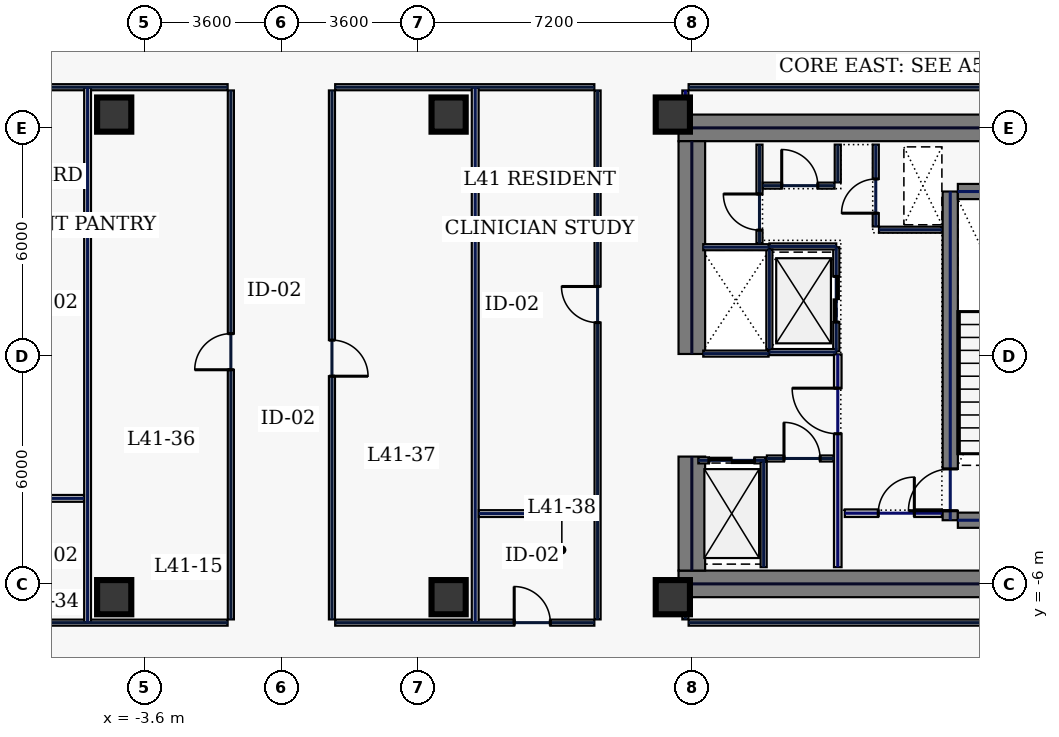
"""IFC4 building model, lengths in metres.
Left out: names, types, materials, properties, quantities, classifications, styles, units other than length and angle.
Written with IfcOpenShell. Run it as: python <this file> out.ifc"""

import sys

from ifc_helpers import new_model, si_unit, direction, frame, frame_2d, origin, origin_2d, place, context, subcontext, project, spatial, rectangle, hollow_rectangle, extrude, element, fill, save


model = new_model("IFC4")
c1 = context("Model", 3, precision=1e-05, world=origin(), true_north=direction((0.0, 1.0)))
c2 = subcontext(c1, "Body", "Model", "MODEL_VIEW")
j1 = project(units=[si_unit("LENGTHUNIT", "METRE"), si_unit("PLANEANGLEUNIT", "RADIAN")], contexts=[c1])
p1 = place(None, origin())
s1 = spatial("IfcSite", under=j1, at=p1, CompositionType="ELEMENT")
p2 = place(p1, origin())
s2 = spatial("IfcBuilding", under=s1, at=p2, CompositionType="ELEMENT")
p3 = place(p2, frame((0.0, 0.0, 180.2)))
s3 = spatial("IfcBuildingStorey", under=s2, at=p3, CompositionType="ELEMENT", Elevation=180.2)
for number, where, z_axis, x_axis in (
    (1, (10.45, 6.0, 0.0), (0.0, 0.0, 1.0), (1.0, 0.0, 0.0)),
    (2, (10.45, -6.0, 0.0), (0.0, 0.0, 1.0), (1.0, 0.0, 0.0)),
):
    element("IfcWall", number, at=place(p3, frame(where, z_axis=z_axis, x_axis=x_axis)), inside=s3, PredefinedType="SHEAR", context=c2, shape_type="SweptSolid", body=[
        extrude(rectangle(XDim=11.55, YDim=0.7, at=frame_2d((5.775, 0.0))), origin(), (0.0, 0.0, 1.0), 3.74),
    ])
p4 = place(p3, frame((10.8, -5.65, 0.0), z_axis=(0.0, 0.0, 1.0), x_axis=(0.0, 1.0, 0.0)))
e3 = element("IfcWall", 3, at=p4, inside=s3, PredefinedType="SHEAR", context=c2, shape_type="SweptSolid", body=[
    extrude(rectangle(XDim=3.0, YDim=0.7, at=frame_2d((1.5, 0.0))), origin(), (0.0, 0.0, 1.0), 3.74),
])
p5 = place(p3, frame((10.8, 0.05, 0.0), z_axis=(0.0, 0.0, 1.0), x_axis=(0.0, 1.0, 0.0)))
e4 = element("IfcWall", 4, at=p5, inside=s3, PredefinedType="SHEAR", context=c2, shape_type="SweptSolid", body=[
    extrude(rectangle(XDim=5.6, YDim=0.7, at=frame_2d((2.8, 0.0))), origin(), (0.0, 0.0, 1.0), 3.74),
])
p6 = place(p3, frame((17.6, -4.325, 0.0), z_axis=(0.0, 0.0, 1.0), x_axis=(0.0, 1.0, 0.0)))
e5 = element("IfcWall", 5, at=p6, inside=s3, PredefinedType="SHEAR", context=c2, shape_type="SweptSolid", body=[
    extrude(rectangle(XDim=8.65, YDim=0.4, at=frame_2d((4.325, 0.0))), origin(), (0.0, 0.0, 1.0), 3.74),
])
p7 = place(p6, frame((0.25, 0.0, 0.0)))
e6 = element("IfcOpeningElement", 6, at=p7, cuts=e5, PredefinedType="OPENING", context=c2, shape_type="SweptSolid", body=[
    extrude(rectangle(XDim=1.1, YDim=2.2, at=frame_2d((0.55, 1.1))), frame((0.0, 0.21, 0.0), z_axis=(0.0, -1.0, 0.0), x_axis=(1.0, 0.0, 0.0)), (0.0, 0.0, 1.0), 0.42),
])
for number, where, z_axis, x_axis in (
    (7, (17.8, -4.325, 0.0), (0.0, 0.0, 1.0), (1.0, 0.0, 0.0)),
    (8, (17.8, 4.325, 0.0), (0.0, 0.0, 1.0), (1.0, 0.0, 0.0)),
):
    element("IfcWall", number, at=place(p3, frame(where, z_axis=z_axis, x_axis=x_axis)), inside=s3, PredefinedType="SHEAR", context=c2, shape_type="SweptSolid", body=[
        extrude(rectangle(XDim=3.4, YDim=0.4, at=frame_2d((1.7, 0.0))), origin(), (0.0, 0.0, 1.0), 3.74),
    ])
for number, where, z_axis, x_axis in (
    (9, (10.3, -6.35, 0.0), (0.0, 0.0, 1.0), (1.0, 0.0, 0.0)),
    (10, (10.3, 6.35, 0.0), (0.0, 0.0, 1.0), (1.0, 0.0, 0.0)),
    (11, (-4.4, -6.35, 0.0), (0.0, 0.0, 1.0), (1.0, 0.0, 0.0)),
    (12, (4.4, -6.35, 0.0), (0.0, 0.0, 1.0), (1.0, 0.0, 0.0)),
    (13, (-4.4, 6.35, 0.0), (0.0, 0.0, 1.0), (1.0, 0.0, 0.0)),
    (14, (4.4, 6.35, 0.0), (0.0, 0.0, 1.0), (1.0, 0.0, 0.0)),
):
    element("IfcColumn", number, at=place(p3, frame(where, z_axis=z_axis, x_axis=x_axis)), inside=s3, PredefinedType="COLUMN", context=c2, shape_type="SweptSolid", body=[
        extrude(hollow_rectangle(XDim=0.9, YDim=0.9, WallThickness=0.04, at=origin_2d()), origin(), (0.0, 0.0, 1.0), 3.74),
    ])
p8 = place(p3, frame((14.6, 0.12, 0.0), z_axis=(0.0, 0.0, 1.0), x_axis=(0.0, 1.0, 0.0)))
e15 = element("IfcWall", 15, at=p8, inside=s3, PredefinedType="PARTITIONING", context=c2, shape_type="SweptSolid", body=[
    extrude(rectangle(XDim=2.74, YDim=0.16, at=frame_2d((1.37, 0.0))), origin(), (0.0, 0.0, 1.0), 3.74),
])
p9 = place(p8, frame((0.77, 0.0, 0.0)))
e16 = element("IfcOpeningElement", 16, at=p9, cuts=e15, PredefinedType="OPENING", context=c2, shape_type="SweptSolid", body=[
    extrude(rectangle(XDim=1.2, YDim=2.2, at=frame_2d((0.6, 1.1))), frame((0.0, 0.09, 0.0), z_axis=(0.0, -1.0, 0.0), x_axis=(1.0, 0.0, 0.0)), (0.0, 0.0, 1.0), 0.18),
])
for number, where, z_axis, x_axis in (
    (17, (12.84, 0.1, 0.0), (0.0, 0.0, 1.0), (1.0, 0.0, 0.0)),
    (18, (12.84, 2.88, 0.0), (0.0, 0.0, 1.0), (1.0, 0.0, 0.0)),
):
    element("IfcWall", number, at=place(p3, frame(where, z_axis=z_axis, x_axis=x_axis)), inside=s3, PredefinedType="PARTITIONING", context=c2, shape_type="SweptSolid", body=[
        extrude(rectangle(XDim=1.76, YDim=0.16, at=frame_2d((0.88, 0.0))), origin(), (0.0, 0.0, 1.0), 3.74),
    ])
p10 = place(p3, frame((12.84, 0.18, 0.0), z_axis=(0.0, 0.0, 1.0), x_axis=(0.0, 1.0, 0.0)))
e19 = element("IfcWall", 19, at=p10, inside=s3, PredefinedType="PARTITIONING", context=c2, shape_type="SweptSolid", body=[
    extrude(rectangle(XDim=2.62, YDim=0.16, at=frame_2d((1.31, 0.0))), origin(), (0.0, 0.0, 1.0), 3.74),
])
p11 = place(p3, frame((10.97, -2.75, 0.0), z_axis=(0.0, 0.0, 1.0), x_axis=(1.0, 0.0, 0.0)))
e20 = element("IfcWall", 20, at=p11, inside=s3, PredefinedType="PARTITIONING", context=c2, shape_type="SweptSolid", body=[
    extrude(rectangle(XDim=1.76, YDim=0.16, at=frame_2d((0.88, 0.0))), origin(), (0.0, 0.0, 1.0), 3.74),
])
p12 = place(p11, frame((0.28, 0.0, 0.0)))
e21 = element("IfcOpeningElement", 21, at=p12, cuts=e20, PredefinedType="OPENING", context=c2, shape_type="SweptSolid", body=[
    extrude(rectangle(XDim=1.2, YDim=2.2, at=frame_2d((0.6, 1.1))), frame((0.0, 0.09, 0.0), z_axis=(0.0, -1.0, 0.0), x_axis=(1.0, 0.0, 0.0)), (0.0, 0.0, 1.0), 0.18),
])
for number, where, z_axis, x_axis in (
    (22, (11.1, 0.06, 0.0), (0.0, 0.0, 1.0), (1.0, 0.0, 0.0)),
    (23, (11.1, 2.86, 0.0), (0.0, 0.0, 1.0), (1.0, 0.0, 0.0)),
):
    element("IfcWall", number, at=place(p3, frame(where, z_axis=z_axis, x_axis=x_axis)), inside=s3, PredefinedType="PARTITIONING", context=c2, shape_type="SweptSolid", body=[
        extrude(rectangle(XDim=1.72, YDim=0.16, at=frame_2d((0.86, 0.0))), origin(), (0.0, 0.0, 1.0), 3.74),
    ])
p13 = place(p3, frame((15.64, 3.405, 0.0), z_axis=(0.0, 0.0, 1.0), x_axis=(0.0, 1.0, 0.0)))
e24 = element("IfcWall", 24, at=p13, inside=s3, PredefinedType="PARTITIONING", context=c2, shape_type="SweptSolid", body=[
    extrude(rectangle(XDim=2.155, YDim=0.16, at=frame_2d((1.078, 0.0))), origin(), (0.0, 0.0, 1.0), 3.74),
])
p14 = place(p13, frame((0.35, 0.0, 0.0)))
e25 = element("IfcOpeningElement", 25, at=p14, cuts=e24, PredefinedType="OPENING", context=c2, shape_type="SweptSolid", body=[
    extrude(rectangle(XDim=0.9, YDim=2.2, at=frame_2d((0.45, 1.1))), frame((0.0, 0.09, 0.0), z_axis=(0.0, -1.0, 0.0), x_axis=(1.0, 0.0, 0.0)), (0.0, 0.0, 1.0), 0.18),
])
p15 = place(p3, frame((15.725, 3.32, 0.0), z_axis=(0.0, 0.0, 1.0), x_axis=(1.0, 0.0, 0.0)))
e26 = element("IfcWall", 26, at=p15, inside=s3, PredefinedType="PARTITIONING", context=c2, shape_type="SweptSolid", body=[
    extrude(rectangle(XDim=1.655, YDim=0.16, at=frame_2d((0.827, 0.0))), origin(), (0.0, 0.0, 1.0), 3.74),
])
p16 = place(p3, frame((14.825, -4.14, 0.0), z_axis=(0.0, 0.0, 1.0), x_axis=(1.0, 0.0, 0.0)))
e27 = element("IfcWall", 27, at=p16, inside=s3, PredefinedType="SOLIDWALL", context=c2, shape_type="SweptSolid", body=[
    extrude(rectangle(XDim=2.555, YDim=0.2, at=frame_2d((1.277, 0.0))), origin(), (0.0, 0.0, 1.0), 3.74),
])
p17 = place(p16, frame((0.88, 0.0, 0.0)))
e28 = element("IfcOpeningElement", 28, at=p17, cuts=e27, PredefinedType="OPENING", context=c2, shape_type="SweptSolid", body=[
    extrude(rectangle(XDim=0.95, YDim=2.2, at=frame_2d((0.475, 1.1))), frame((0.0, 0.11, 0.0), z_axis=(0.0, -1.0, 0.0), x_axis=(1.0, 0.0, 0.0)), (0.0, 0.0, 1.0), 0.22),
])
p18 = place(p3, frame((12.775, -2.7, 0.0), z_axis=(0.0, 0.0, 1.0), x_axis=(1.0, 0.0, 0.0)))
e29 = element("IfcWall", 29, at=p18, inside=s3, PredefinedType="PARTITIONING", context=c2, shape_type="SweptSolid", body=[
    extrude(rectangle(XDim=1.76, YDim=0.16, at=frame_2d((0.88, 0.0))), origin(), (0.0, 0.0, 1.0), 3.74),
])
p19 = place(p18, frame((0.45, 0.0, 0.0)))
e30 = element("IfcOpeningElement", 30, at=p19, cuts=e29, PredefinedType="OPENING", context=c2, shape_type="SweptSolid", body=[
    extrude(rectangle(XDim=0.95, YDim=2.2, at=frame_2d((0.475, 1.1))), frame((0.0, 0.09, 0.0), z_axis=(0.0, -1.0, 0.0), x_axis=(1.0, 0.0, 0.0)), (0.0, 0.0, 1.0), 0.18),
])
p20 = place(p3, frame((12.69, -5.56, 0.0), z_axis=(0.0, 0.0, 1.0), x_axis=(0.0, 1.0, 0.0)))
e31 = element("IfcWall", 31, at=p20, inside=s3, PredefinedType="PARTITIONING", context=c2, shape_type="SweptSolid", body=[
    extrude(rectangle(XDim=2.775, YDim=0.16, at=frame_2d((1.388, 0.0))), origin(), (0.0, 0.0, 1.0), 3.74),
])
p21 = place(p3, frame((12.58, 2.96, 0.0), z_axis=(0.0, 0.0, 1.0), x_axis=(0.0, 1.0, 0.0)))
e32 = element("IfcWall", 32, at=p21, inside=s3, PredefinedType="PARTITIONING", context=c2, shape_type="SweptSolid", body=[
    extrude(rectangle(XDim=2.6, YDim=0.16, at=frame_2d((1.3, 0.0))), origin(), (0.0, 0.0, 1.0), 3.74),
])
p22 = place(p21, frame((0.35, 0.0, 0.0)))
e33 = element("IfcOpeningElement", 33, at=p22, cuts=e32, PredefinedType="OPENING", context=c2, shape_type="SweptSolid", body=[
    extrude(rectangle(XDim=0.95, YDim=2.2, at=frame_2d((0.475, 1.1))), frame((0.0, 0.09, 0.0), z_axis=(0.0, -1.0, 0.0), x_axis=(1.0, 0.0, 0.0)), (0.0, 0.0, 1.0), 0.18),
])
p23 = place(p3, frame((12.665, 4.48, 0.0), z_axis=(0.0, 0.0, 1.0), x_axis=(1.0, 0.0, 0.0)))
e34 = element("IfcWall", 34, at=p23, inside=s3, PredefinedType="PARTITIONING", context=c2, shape_type="SweptSolid", body=[
    extrude(rectangle(XDim=1.89, YDim=0.16, at=frame_2d((0.945, 0.0))), origin(), (0.0, 0.0, 1.0), 3.74),
])
p24 = place(p23, frame((0.5, 0.0, 0.0)))
e35 = element("IfcOpeningElement", 35, at=p24, cuts=e34, PredefinedType="OPENING", context=c2, shape_type="SweptSolid", body=[
    extrude(rectangle(XDim=0.95, YDim=2.2, at=frame_2d((0.475, 1.1))), frame((0.0, 0.09, 0.0), z_axis=(0.0, -1.0, 0.0), x_axis=(1.0, 0.0, 0.0)), (0.0, 0.0, 1.0), 0.18),
])
p25 = place(p3, frame((14.64, 4.565, 0.0), z_axis=(0.0, 0.0, 1.0), x_axis=(0.0, 1.0, 0.0)))
e36 = element("IfcWall", 36, at=p25, inside=s3, PredefinedType="PARTITIONING", context=c2, shape_type="SweptSolid", body=[
    extrude(rectangle(XDim=0.995, YDim=0.16, at=frame_2d((0.498, 0.0))), origin(), (0.0, 0.0, 1.0), 3.74),
])
p26 = place(p3, frame((14.64, -5.56, 0.0), z_axis=(0.0, 0.0, 1.0), x_axis=(0.0, 1.0, 0.0)))
e37 = element("IfcWall", 37, at=p26, inside=s3, PredefinedType="SOLIDWALL", context=c2, shape_type="SweptSolid", body=[
    extrude(rectangle(XDim=5.6, YDim=0.2, at=frame_2d((2.8, 0.0))), origin(), (0.0, 0.0, 1.0), 3.74),
])
p27 = place(p26, frame((3.51, 0.0, 0.0)))
e38 = element("IfcOpeningElement", 38, at=p27, cuts=e37, PredefinedType="OPENING", context=c2, shape_type="SweptSolid", body=[
    extrude(rectangle(XDim=1.2, YDim=2.2, at=frame_2d((0.6, 1.1))), frame((0.0, 0.11, 0.0), z_axis=(0.0, -1.0, 0.0), x_axis=(1.0, 0.0, 0.0)), (0.0, 0.0, 1.0), 0.22),
])
p28 = place(p3, frame((24.965, 7.07, 0.0), z_axis=(0.0, 0.0, 1.0), x_axis=(-1.0, 0.0, 0.0)))
e39 = element("IfcWall", 39, at=p28, inside=s3, PredefinedType="PARTITIONING", context=c2, shape_type="SweptSolid", body=[
    extrude(rectangle(XDim=14.25, YDim=0.16, at=frame_2d((7.125, 0.0))), origin(), (0.0, 0.0, 1.0), 3.74),
])
p29 = place(p3, frame((10.63, 6.985, 0.0), z_axis=(0.0, 0.0, 1.0), x_axis=(0.0, -1.0, 0.0)))
e40 = element("IfcWall", 40, at=p29, inside=s3, PredefinedType="PARTITIONING", context=c2, shape_type="SweptSolid", body=[
    extrude(rectangle(XDim=0.565, YDim=0.16, at=frame_2d((0.283, 0.0))), origin(), (0.0, 0.0, 1.0), 1.535),
])
p30 = place(p3, frame((10.63, -6.42, 0.0), z_axis=(0.0, 0.0, 1.0), x_axis=(0.0, -1.0, 0.0)))
e41 = element("IfcWall", 41, at=p30, inside=s3, PredefinedType="PARTITIONING", context=c2, shape_type="SweptSolid", body=[
    extrude(rectangle(XDim=0.515, YDim=0.16, at=frame_2d((0.258, 0.0))), origin(), (0.0, 0.0, 1.0), 3.74),
])
p31 = place(p3, frame((10.715, -7.02, 0.0), z_axis=(0.0, 0.0, 1.0), x_axis=(1.0, 0.0, 0.0)))
e42 = element("IfcWall", 42, at=p31, inside=s3, PredefinedType="PARTITIONING", context=c2, shape_type="SweptSolid", body=[
    extrude(rectangle(XDim=14.25, YDim=0.16, at=frame_2d((7.125, 0.0))), origin(), (0.0, 0.0, 1.0), 3.74),
])
p32 = place(p3, frame((8.235, 7.07, 0.0), z_axis=(0.0, 0.0, 1.0), x_axis=(-1.0, 0.0, 0.0)))
e43 = element("IfcWall", 43, at=p32, inside=s3, PredefinedType="PARTITIONING", context=c2, shape_type="SweptSolid", body=[
    extrude(rectangle(XDim=6.82, YDim=0.16, at=frame_2d((3.41, 0.0))), origin(), (0.0, 0.0, 1.0), 3.74),
])
p33 = place(p3, frame((1.33, 6.985, 0.0), z_axis=(0.0, 0.0, 1.0), x_axis=(0.0, -1.0, 0.0)))
e44 = element("IfcWall", 44, at=p33, inside=s3, PredefinedType="PARTITIONING", context=c2, shape_type="SweptSolid", body=[
    extrude(rectangle(XDim=13.92, YDim=0.16, at=frame_2d((6.96, 0.0))), origin(), (0.0, 0.0, 1.0), 3.74),
])
p34 = place(p33, frame((6.57, 0.0, 0.0)))
e45 = element("IfcOpeningElement", 45, at=p34, cuts=e44, PredefinedType="OPENING", context=c2, shape_type="SweptSolid", body=[
    extrude(rectangle(XDim=0.95, YDim=2.2, at=frame_2d((0.475, 1.1))), frame((0.0, 0.09, 0.0), z_axis=(0.0, -1.0, 0.0), x_axis=(1.0, 0.0, 0.0)), (0.0, 0.0, 1.0), 0.18),
])
p35 = place(p3, frame((1.415, -7.02, 0.0), z_axis=(0.0, 0.0, 1.0), x_axis=(1.0, 0.0, 0.0)))
e46 = element("IfcWall", 46, at=p35, inside=s3, PredefinedType="PARTITIONING", context=c2, shape_type="SweptSolid", body=[
    extrude(rectangle(XDim=6.82, YDim=0.16, at=frame_2d((3.41, 0.0))), origin(), (0.0, 0.0, 1.0), 3.74),
])
p36 = place(p35, frame((4.711, 0.0, 0.0)))
e47 = element("IfcOpeningElement", 47, at=p36, cuts=e46, PredefinedType="OPENING", context=c2, shape_type="SweptSolid", body=[
    extrude(rectangle(XDim=0.95, YDim=2.2, at=frame_2d((0.475, 1.1))), frame((0.0, 0.09, 0.0), z_axis=(0.0, -1.0, 0.0), x_axis=(1.0, 0.0, 0.0)), (0.0, 0.0, 1.0), 0.18),
])
p37 = place(p3, frame((8.32, -6.935, 0.0), z_axis=(0.0, 0.0, 1.0), x_axis=(0.0, 1.0, 0.0)))
e48 = element("IfcWall", 48, at=p37, inside=s3, PredefinedType="PARTITIONING", context=c2, shape_type="SweptSolid", body=[
    extrude(rectangle(XDim=13.92, YDim=0.16, at=frame_2d((6.96, 0.0))), origin(), (0.0, 0.0, 1.0), 3.74),
])
p38 = place(p37, frame((7.811, 0.0, 0.0)))
e49 = element("IfcOpeningElement", 49, at=p38, cuts=e48, PredefinedType="OPENING", context=c2, shape_type="SweptSolid", body=[
    extrude(rectangle(XDim=0.95, YDim=2.2, at=frame_2d((0.475, 1.1))), frame((0.0, 0.09, 0.0), z_axis=(0.0, -1.0, 0.0), x_axis=(1.0, 0.0, 0.0)), (0.0, 0.0, 1.0), 0.18),
])
p39 = place(p3, frame((-1.33, -6.935, 0.0), z_axis=(0.0, 0.0, 1.0), x_axis=(0.0, 1.0, 0.0)))
e50 = element("IfcWall", 50, at=p39, inside=s3, PredefinedType="PARTITIONING", context=c2, shape_type="SweptSolid", body=[
    extrude(rectangle(XDim=13.92, YDim=0.16, at=frame_2d((6.96, 0.0))), origin(), (0.0, 0.0, 1.0), 3.74),
])
p40 = place(p39, frame((6.57, 0.0, 0.0)))
e51 = element("IfcOpeningElement", 51, at=p40, cuts=e50, PredefinedType="OPENING", context=c2, shape_type="SweptSolid", body=[
    extrude(rectangle(XDim=0.95, YDim=2.2, at=frame_2d((0.475, 1.1))), frame((0.0, 0.09, 0.0), z_axis=(0.0, -1.0, 0.0), x_axis=(1.0, 0.0, 0.0)), (0.0, 0.0, 1.0), 0.18),
])
for number, where, z_axis, x_axis in (
    (52, (-1.415, 7.07, 0.0), (0.0, 0.0, 1.0), (-1.0, 0.0, 0.0)),
    (53, (-8.235, -7.02, 0.0), (0.0, 0.0, 1.0), (1.0, 0.0, 0.0)),
):
    element("IfcWall", number, at=place(p3, frame(where, z_axis=z_axis, x_axis=x_axis)), inside=s3, PredefinedType="PARTITIONING", context=c2, shape_type="SweptSolid", body=[
        extrude(rectangle(XDim=6.82, YDim=0.16, at=frame_2d((3.41, 0.0))), origin(), (0.0, 0.0, 1.0), 3.74),
    ])
for number, where, z_axis, x_axis in (
    (54, (-5.1, -7.015, 0.0), (0.0, 0.0, 1.0), (0.0, 1.0, 0.0)),
    (55, (5.1, -7.015, 0.0), (0.0, 0.0, 1.0), (0.0, 1.0, 0.0)),
):
    element("IfcWall", number, at=place(p3, frame(where, z_axis=z_axis, x_axis=x_axis)), inside=s3, PredefinedType="PARTITIONING", context=c2, shape_type="SweptSolid", body=[
        extrude(rectangle(XDim=14.08, YDim=0.18, at=frame_2d((7.04, 0.0))), origin(), (0.0, 0.0, 1.0), 3.74),
    ])
for number, where, z_axis, x_axis in (
    (56, (-8.315, -3.75, 0.0), (0.0, 0.0, 1.0), (1.0, 0.0, 0.0)),
    (57, (5.195, -4.15, 0.0), (0.0, 0.0, 1.0), (1.0, 0.0, 0.0)),
):
    element("IfcWall", number, at=place(p3, frame(where, z_axis=z_axis, x_axis=x_axis)), inside=s3, PredefinedType="PARTITIONING", context=c2, shape_type="SweptSolid", body=[
        extrude(rectangle(XDim=3.12, YDim=0.18, at=frame_2d((1.56, 0.0))), origin(), (0.0, 0.0, 1.0), 3.74),
    ])
p41 = place(p7, origin())
e58 = element("IfcDoor", 58, at=p41, inside=s3, OperationType="SINGLE_SWING_LEFT", PredefinedType="DOOR", context=c2, shape_type="SweptSolid", body=[
    extrude(rectangle(XDim=1.1, YDim=2.2, at=frame_2d((0.55, 1.1))), frame((0.0, 0.025, 0.0), z_axis=(0.0, -1.0, 0.0), x_axis=(1.0, 0.0, 0.0)), (0.0, 0.0, 1.0), 0.05),
])
fill(e6, e58)
p42 = place(p9, origin())
e59 = element("IfcDoor", 59, at=p42, inside=s3, OperationType="SLIDING_TO_LEFT", PredefinedType="DOOR", context=c2, shape_type="SweptSolid", body=[
    extrude(rectangle(XDim=1.2, YDim=2.2, at=frame_2d((0.6, 1.1))), frame((0.0, 0.025, 0.0), z_axis=(0.0, -1.0, 0.0), x_axis=(1.0, 0.0, 0.0)), (0.0, 0.0, 1.0), 0.05),
])
fill(e16, e59)
p43 = place(p12, origin())
e60 = element("IfcDoor", 60, at=p43, inside=s3, OperationType="SLIDING_TO_LEFT", PredefinedType="DOOR", context=c2, shape_type="SweptSolid", body=[
    extrude(rectangle(XDim=1.2, YDim=2.2, at=frame_2d((0.6, 1.1))), frame((0.0, 0.025, 0.0), z_axis=(0.0, -1.0, 0.0), x_axis=(1.0, 0.0, 0.0)), (0.0, 0.0, 1.0), 0.05),
])
fill(e21, e60)
p44 = place(p14, origin())
e61 = element("IfcDoor", 61, at=p44, inside=s3, OperationType="SINGLE_SWING_LEFT", PredefinedType="DOOR", context=c2, shape_type="SweptSolid", body=[
    extrude(rectangle(XDim=0.9, YDim=2.2, at=frame_2d((0.45, 1.1))), frame((0.0, 0.025, 0.0), z_axis=(0.0, -1.0, 0.0), x_axis=(1.0, 0.0, 0.0)), (0.0, 0.0, 1.0), 0.05),
])
fill(e25, e61)
p45 = place(p17, origin())
e62 = element("IfcDoor", 62, at=p45, inside=s3, OperationType="SINGLE_SWING_RIGHT", PredefinedType="DOOR", context=c2, shape_type="SweptSolid", body=[
    extrude(rectangle(XDim=0.95, YDim=2.2, at=frame_2d((0.475, 1.1))), frame((0.0, 0.025, 0.0), z_axis=(0.0, -1.0, 0.0), x_axis=(1.0, 0.0, 0.0)), (0.0, 0.0, 1.0), 0.05),
])
fill(e28, e62)
p46 = place(p19, origin())
e63 = element("IfcDoor", 63, at=p46, inside=s3, OperationType="SINGLE_SWING_LEFT", PredefinedType="DOOR", context=c2, shape_type="SweptSolid", body=[
    extrude(rectangle(XDim=0.95, YDim=2.2, at=frame_2d((0.475, 1.1))), frame((0.0, 0.025, 0.0), z_axis=(0.0, -1.0, 0.0), x_axis=(1.0, 0.0, 0.0)), (0.0, 0.0, 1.0), 0.05),
])
fill(e30, e63)
p47 = place(p22, origin())
e64 = element("IfcDoor", 64, at=p47, inside=s3, OperationType="SINGLE_SWING_RIGHT", PredefinedType="DOOR", context=c2, shape_type="SweptSolid", body=[
    extrude(rectangle(XDim=0.95, YDim=2.2, at=frame_2d((0.475, 1.1))), frame((0.0, 0.025, 0.0), z_axis=(0.0, -1.0, 0.0), x_axis=(1.0, 0.0, 0.0)), (0.0, 0.0, 1.0), 0.05),
])
fill(e33, e64)
p48 = place(p24, origin())
e65 = element("IfcDoor", 65, at=p48, inside=s3, OperationType="SINGLE_SWING_LEFT", PredefinedType="DOOR", context=c2, shape_type="SweptSolid", body=[
    extrude(rectangle(XDim=0.95, YDim=2.2, at=frame_2d((0.475, 1.1))), frame((0.0, 0.025, 0.0), z_axis=(0.0, -1.0, 0.0), x_axis=(1.0, 0.0, 0.0)), (0.0, 0.0, 1.0), 0.05),
])
fill(e35, e65)
p49 = place(p27, origin())
e66 = element("IfcDoor", 66, at=p49, inside=s3, OperationType="SINGLE_SWING_RIGHT", PredefinedType="DOOR", context=c2, shape_type="SweptSolid", body=[
    extrude(rectangle(XDim=1.2, YDim=2.2, at=frame_2d((0.6, 1.1))), frame((0.0, 0.025, 0.0), z_axis=(0.0, -1.0, 0.0), x_axis=(1.0, 0.0, 0.0)), (0.0, 0.0, 1.0), 0.05),
])
fill(e38, e66)
p50 = place(p40, origin())
e67 = element("IfcDoor", 67, at=p50, inside=s3, OperationType="SINGLE_SWING_LEFT", PredefinedType="DOOR", context=c2, shape_type="SweptSolid", body=[
    extrude(rectangle(XDim=0.95, YDim=2.2, at=frame_2d((0.475, 1.1))), frame((0.0, 0.025, 0.0), z_axis=(0.0, -1.0, 0.0), x_axis=(1.0, 0.0, 0.0)), (0.0, 0.0, 1.0), 0.05),
])
fill(e51, e67)
p51 = place(p34, origin())
e68 = element("IfcDoor", 68, at=p51, inside=s3, OperationType="SINGLE_SWING_RIGHT", PredefinedType="DOOR", context=c2, shape_type="SweptSolid", body=[
    extrude(rectangle(XDim=0.95, YDim=2.2, at=frame_2d((0.475, 1.1))), frame((0.0, 0.025, 0.0), z_axis=(0.0, -1.0, 0.0), x_axis=(1.0, 0.0, 0.0)), (0.0, 0.0, 1.0), 0.05),
])
fill(e45, e68)
p52 = place(p36, origin())
e69 = element("IfcDoor", 69, at=p52, inside=s3, OperationType="SINGLE_SWING_LEFT", PredefinedType="DOOR", context=c2, shape_type="SweptSolid", body=[
    extrude(rectangle(XDim=0.95, YDim=2.2, at=frame_2d((0.475, 1.1))), frame((0.0, 0.025, 0.0), z_axis=(0.0, -1.0, 0.0), x_axis=(1.0, 0.0, 0.0)), (0.0, 0.0, 1.0), 0.05),
])
fill(e47, e69)
p53 = place(p38, origin())
e70 = element("IfcDoor", 70, at=p53, inside=s3, OperationType="SINGLE_SWING_RIGHT", PredefinedType="DOOR", context=c2, shape_type="SweptSolid", body=[
    extrude(rectangle(XDim=0.95, YDim=2.2, at=frame_2d((0.475, 1.1))), frame((0.0, 0.025, 0.0), z_axis=(0.0, -1.0, 0.0), x_axis=(1.0, 0.0, 0.0)), (0.0, 0.0, 1.0), 0.05),
])
fill(e49, e70)
save(model, sys.argv[1])
